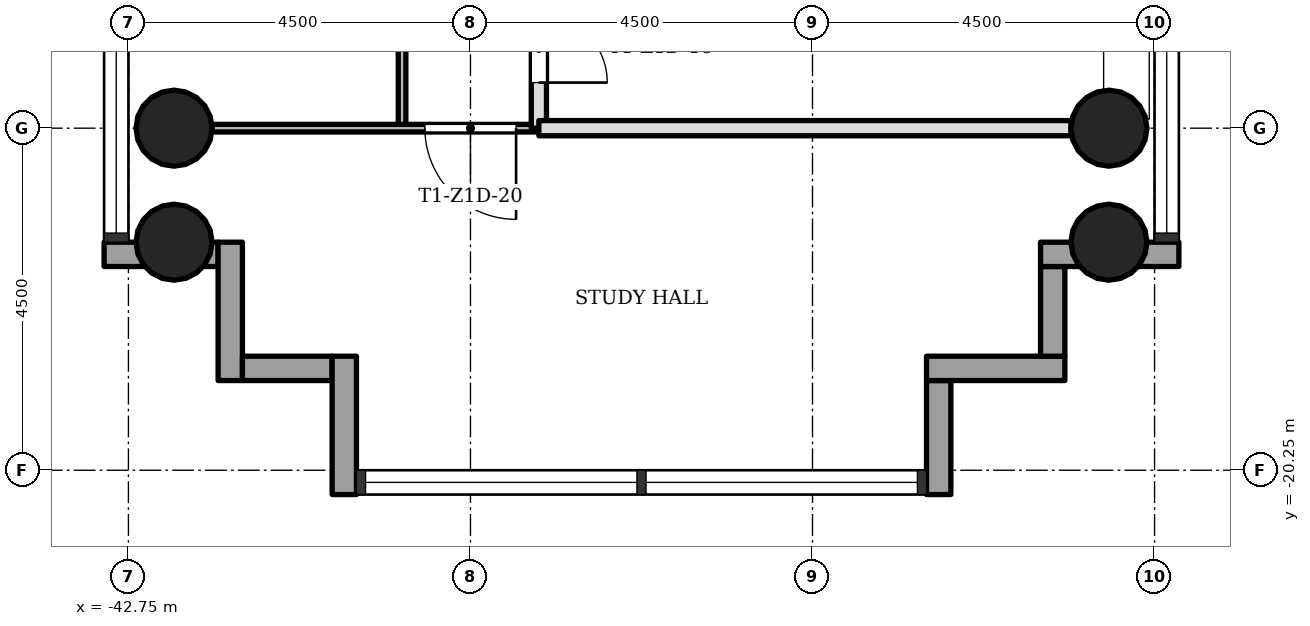
"""IFC4 building model, lengths in metres.
Left out: names, types, materials, properties, quantities, classifications, styles, units other than length and angle.
Written with IfcOpenShell. Run it as: python <this file> out.ifc"""

import sys

from ifc_helpers import new_model, si_unit, direction, frame, frame_2d, origin, origin_2d, place, context, subcontext, project, spatial, rectangle, hollow_circle, extrude, element, fill, save


model = new_model("IFC4")
c1 = context("Model", 3, precision=1e-05, world=origin(), true_north=direction((0.0, 1.0)))
c2 = subcontext(c1, "Body", "Model", "MODEL_VIEW")
j1 = project(units=[si_unit("LENGTHUNIT", "METRE"), si_unit("PLANEANGLEUNIT", "RADIAN")], contexts=[c1])
p1 = place(None, origin())
s1 = spatial("IfcSite", under=j1, at=p1, CompositionType="ELEMENT")
p2 = place(p1, origin())
s2 = spatial("IfcBuilding", under=s1, at=p2, CompositionType="ELEMENT")
p3 = place(p2, frame((0.0, 0.0, 61.9)))
s3 = spatial("IfcBuildingStorey", under=s2, at=p3, CompositionType="ELEMENT", Elevation=61.9)
for number, where, z_axis, x_axis in (
    (1, (-42.15, -15.75, 0.0), (0.0, 0.0, 1.0), (1.0, 0.0, 0.0)),
    (2, (-29.85, -15.75, 0.0), (0.0, 0.0, 1.0), (1.0, 0.0, 0.0)),
    (3, (-42.15, -17.25, 0.0), (0.0, 0.0, 1.0), (1.0, 0.0, 0.0)),
    (4, (-29.85, -17.25, 0.0), (0.0, 0.0, 1.0), (1.0, 0.0, 0.0)),
):
    element("IfcColumn", number, at=place(p3, frame(where, z_axis=z_axis, x_axis=x_axis)), inside=s3, PredefinedType="COLUMN", context=c2, shape_type="SweptSolid", body=[
        extrude(hollow_circle(Radius=0.5, WallThickness=0.036, at=origin_2d()), origin(), (0.0, 0.0, 1.0), 3.4),
    ])
p4 = place(p3, frame((-43.07, -17.41, -0.3), z_axis=(0.0, 0.0, 1.0), x_axis=(1.0, 0.0, 0.0)))
e5 = element("IfcWall", 5, at=p4, inside=s3, PredefinedType="STANDARD", context=c2, shape_type="SweptSolid", body=[
    extrude(rectangle(XDim=1.5, YDim=0.32, at=frame_2d((0.75, 0.0))), origin(), (0.0, 0.0, 1.0), 3.4),
])
p5 = place(p3, frame((-41.41, -17.25, -0.3), z_axis=(0.0, 0.0, 1.0), x_axis=(0.0, -1.0, 0.0)))
e6 = element("IfcWall", 6, at=p5, inside=s3, PredefinedType="STANDARD", context=c2, shape_type="SweptSolid", body=[
    extrude(rectangle(XDim=1.82, YDim=0.32, at=frame_2d((0.91, 0.0))), origin(), (0.0, 0.0, 1.0), 3.4),
])
p6 = place(p3, frame((-41.25, -18.91, -0.3), z_axis=(0.0, 0.0, 1.0), x_axis=(1.0, 0.0, 0.0)))
e7 = element("IfcWall", 7, at=p6, inside=s3, PredefinedType="STANDARD", context=c2, shape_type="SweptSolid", body=[
    extrude(rectangle(XDim=1.18, YDim=0.32, at=frame_2d((0.59, 0.0))), origin(), (0.0, 0.0, 1.0), 3.4),
])
p7 = place(p3, frame((-39.91, -18.75, -0.3), z_axis=(0.0, 0.0, 1.0), x_axis=(0.0, -1.0, 0.0)))
e8 = element("IfcWall", 8, at=p7, inside=s3, PredefinedType="STANDARD", context=c2, shape_type="SweptSolid", body=[
    extrude(rectangle(XDim=1.82, YDim=0.32, at=frame_2d((0.91, 0.0))), origin(), (0.0, 0.0, 1.0), 3.4),
])
p8 = place(p3, frame((-32.09, -20.57, -0.3), z_axis=(0.0, 0.0, 1.0), x_axis=(0.0, 1.0, 0.0)))
e9 = element("IfcWall", 9, at=p8, inside=s3, PredefinedType="STANDARD", context=c2, shape_type="SweptSolid", body=[
    extrude(rectangle(XDim=1.5, YDim=0.32, at=frame_2d((0.75, 0.0))), origin(), (0.0, 0.0, 1.0), 3.4),
])
p9 = place(p3, frame((-32.25, -18.91, -0.3), z_axis=(0.0, 0.0, 1.0), x_axis=(1.0, 0.0, 0.0)))
e10 = element("IfcWall", 10, at=p9, inside=s3, PredefinedType="STANDARD", context=c2, shape_type="SweptSolid", body=[
    extrude(rectangle(XDim=1.82, YDim=0.32, at=frame_2d((0.91, 0.0))), origin(), (0.0, 0.0, 1.0), 3.4),
])
p10 = place(p3, frame((-30.59, -18.75, -0.3), z_axis=(0.0, 0.0, 1.0), x_axis=(0.0, 1.0, 0.0)))
e11 = element("IfcWall", 11, at=p10, inside=s3, PredefinedType="STANDARD", context=c2, shape_type="SweptSolid", body=[
    extrude(rectangle(XDim=1.18, YDim=0.32, at=frame_2d((0.59, 0.0))), origin(), (0.0, 0.0, 1.0), 3.4),
])
p11 = place(p3, frame((-30.75, -17.41, -0.3), z_axis=(0.0, 0.0, 1.0), x_axis=(1.0, 0.0, 0.0)))
e12 = element("IfcWall", 12, at=p11, inside=s3, PredefinedType="STANDARD", context=c2, shape_type="SweptSolid", body=[
    extrude(rectangle(XDim=1.82, YDim=0.32, at=frame_2d((0.91, 0.0))), origin(), (0.0, 0.0, 1.0), 3.4),
])
p12 = place(p3, frame((-39.15, -15.75, 0.0), z_axis=(0.0, 0.0, 1.0), x_axis=(0.0, 1.0, 0.0)))
e13 = element("IfcWall", 13, at=p12, inside=s3, PredefinedType="PARTITIONING", context=c2, shape_type="SweptSolid", body=[
    extrude(rectangle(XDim=9.0, YDim=0.1, at=frame_2d((4.5, 0.0))), origin(), (0.0, 0.0, 1.0), 3.0),
])
p13 = place(p12, frame((6.3, 0.0, 0.0)))
e14 = element("IfcOpeningElement", 14, at=p13, cuts=e13, PredefinedType="OPENING", context=c2, shape_type="SweptSolid", body=[
    extrude(rectangle(XDim=0.9, YDim=2.1, at=frame_2d((0.45, 1.05))), frame((0.0, 0.06, 0.0), z_axis=(0.0, -1.0, 0.0), x_axis=(1.0, 0.0, 0.0)), (0.0, 0.0, 1.0), 0.12),
])
p14 = place(p12, frame((1.8, 0.0, 0.0)))
e15 = element("IfcOpeningElement", 15, at=p14, cuts=e13, PredefinedType="OPENING", context=c2, shape_type="SweptSolid", body=[
    extrude(rectangle(XDim=0.9, YDim=2.1, at=frame_2d((0.45, 1.05))), frame((0.0, 0.06, 0.0), z_axis=(0.0, -1.0, 0.0), x_axis=(1.0, 0.0, 0.0)), (0.0, 0.0, 1.0), 0.12),
])
p15 = place(p3, frame((-37.35, -15.75, 0.0), z_axis=(0.0, 0.0, 1.0), x_axis=(0.0, 1.0, 0.0)))
e16 = element("IfcWall", 16, at=p15, inside=s3, PredefinedType="SOLIDWALL", context=c2, shape_type="SweptSolid", body=[
    extrude(rectangle(XDim=4.5, YDim=0.2, at=frame_2d((2.25, 0.0))), origin(), (0.0, 0.0, 1.0), 3.0),
])
p16 = place(p15, frame((0.6, 0.0, 0.0)))
e17 = element("IfcOpeningElement", 17, at=p16, cuts=e16, PredefinedType="OPENING", context=c2, shape_type="SweptSolid", body=[
    extrude(rectangle(XDim=0.9, YDim=2.1, at=frame_2d((0.45, 1.05))), frame((0.0, 0.11, 0.0), z_axis=(0.0, -1.0, 0.0), x_axis=(1.0, 0.0, 0.0)), (0.0, 0.0, 1.0), 0.22),
])
p17 = place(p3, frame((-41.65, -15.75, 0.0), z_axis=(0.0, 0.0, 1.0), x_axis=(1.0, 0.0, 0.0)))
e18 = element("IfcWall", 18, at=p17, inside=s3, PredefinedType="PARTITIONING", context=c2, shape_type="SweptSolid", body=[
    extrude(rectangle(XDim=4.3, YDim=0.1, at=frame_2d((2.15, 0.0))), origin(), (0.0, 0.0, 1.0), 3.0),
])
p18 = place(p17, frame((2.8, 0.0, 0.0)))
e19 = element("IfcOpeningElement", 19, at=p18, cuts=e18, PredefinedType="OPENING", context=c2, shape_type="SweptSolid", body=[
    extrude(rectangle(XDim=1.2, YDim=2.1, at=frame_2d((0.6, 1.05))), frame((0.0, 0.06, 0.0), z_axis=(0.0, -1.0, 0.0), x_axis=(1.0, 0.0, 0.0)), (0.0, 0.0, 1.0), 0.12),
])
p19 = place(p3, frame((-37.35, -15.75, 0.0), z_axis=(0.0, 0.0, 1.0), x_axis=(1.0, 0.0, 0.0)))
e20 = element("IfcWall", 20, at=p19, inside=s3, PredefinedType="SOLIDWALL", context=c2, shape_type="SweptSolid", body=[
    extrude(rectangle(XDim=7.0, YDim=0.2, at=frame_2d((3.5, 0.0))), origin(), (0.0, 0.0, 1.0), 3.0),
])
p20 = place(p16, origin())
e21 = element("IfcDoor", 21, at=p20, inside=s3, OperationType="SINGLE_SWING_LEFT", PredefinedType="DOOR", context=c2, shape_type="SweptSolid", body=[
    extrude(rectangle(XDim=0.9, YDim=2.1, at=frame_2d((0.45, 1.05))), frame((0.0, 0.025, 0.0), z_axis=(0.0, -1.0, 0.0), x_axis=(1.0, 0.0, 0.0)), (0.0, 0.0, 1.0), 0.05),
])
fill(e17, e21)
p21 = place(p18, origin())
e22 = element("IfcDoor", 22, at=p21, inside=s3, OperationType="SINGLE_SWING_RIGHT", PredefinedType="DOOR", context=c2, shape_type="SweptSolid", body=[
    extrude(rectangle(XDim=1.2, YDim=2.1, at=frame_2d((0.6, 1.05))), frame((0.0, 0.025, 0.0), z_axis=(0.0, -1.0, 0.0), x_axis=(1.0, 0.0, 0.0)), (0.0, 0.0, 1.0), 0.05),
])
fill(e19, e22)
save(model, sys.argv[1])
